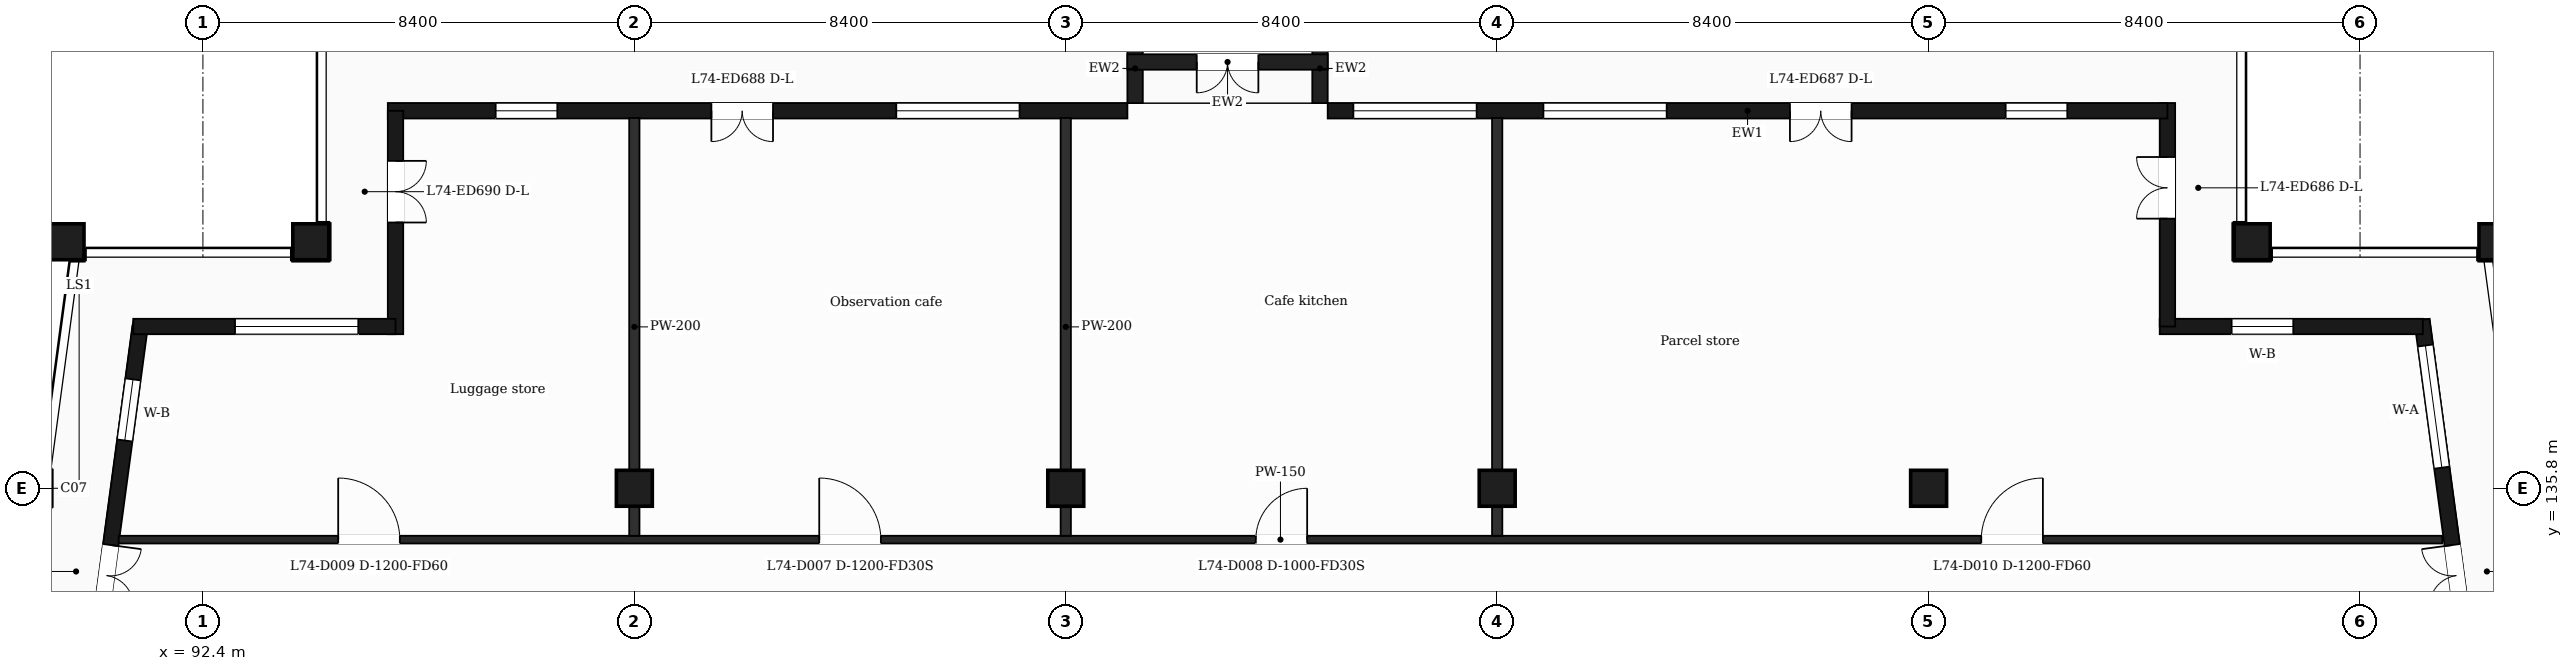
"""IFC4 building model, lengths in metres.
Left out: names, types, materials, properties, quantities, classifications, styles, units other than length and angle.
Written with IfcOpenShell. Run it as: python <this file> out.ifc"""

import sys

from ifc_helpers import new_model, si_unit, direction, frame, frame_2d, origin, origin_2d, place, context, subcontext, project, spatial, rectangle, extrude, element, fill, save


model = new_model("IFC4")
c1 = context("Model", 3, precision=1e-05, world=origin(), true_north=direction((0.0, 1.0)))
c2 = subcontext(c1, "Body", "Model", "MODEL_VIEW")
j1 = project(units=[si_unit("LENGTHUNIT", "METRE"), si_unit("PLANEANGLEUNIT", "RADIAN")], contexts=[c1])
p1 = place(None, origin())
s1 = spatial("IfcSite", under=j1, at=p1, CompositionType="ELEMENT")
p2 = place(p1, origin())
s2 = spatial("IfcBuilding", under=s1, at=p2, CompositionType="ELEMENT")
p3 = place(p2, frame((0.0, 0.0, 303.4)))
s3 = spatial("IfcBuildingStorey", under=s2, at=p3, CompositionType="ELEMENT", Elevation=303.4)
for number, where, z_axis, x_axis in (
    (1, (94.5, 140.6, 0.0), (0.0, 0.0, 1.0), (1.0, 0.0, 0.0)),
    (2, (132.3, 140.6, 0.0), (0.0, 0.0, 1.0), (1.0, 0.0, 0.0)),
    (3, (89.735, 140.6, 0.0), (0.0, 0.0, 1.0), (1.0, 0.0, 0.0)),
    (4, (137.065, 140.6, 0.0), (0.0, 0.0, 1.0), (1.0, 0.0, 0.0)),
    (5, (100.8, 135.8, 0.0), (0.0, 0.0, 1.0), (1.0, 0.0, 0.0)),
    (6, (109.2, 135.8, 0.0), (0.0, 0.0, 1.0), (1.0, 0.0, 0.0)),
    (7, (117.6, 135.8, 0.0), (0.0, 0.0, 1.0), (1.0, 0.0, 0.0)),
    (8, (126.0, 135.8, 0.0), (0.0, 0.0, 1.0), (1.0, 0.0, 0.0)),
):
    element("IfcColumn", number, at=place(p3, frame(where, z_axis=z_axis, x_axis=x_axis)), inside=s3, PredefinedType="COLUMN", context=c2, shape_type="SweptSolid", body=[
        extrude(rectangle(XDim=0.7, YDim=0.7, at=origin_2d()), origin(), (0.0, 0.0, 1.0), 4.5),
    ])
p4 = place(p3, frame((91.177, 138.95, 0.0), z_axis=(0.0, 0.0, 1.0), x_axis=(-0.133426664613, -0.991058689065, 0.0)))
e9 = element("IfcWall", 9, at=p4, inside=s3, PredefinedType="SOLIDWALL", context=c2, shape_type="SweptSolid", body=[
    extrude(rectangle(XDim=6.609, YDim=0.3, at=frame_2d((3.305, 0.0))), origin(), (0.0, 0.0, 1.0), 4.05),
])
p5 = place(p4, frame((1.039, 0.0, 0.9)))
e10 = element("IfcOpeningElement", 10, at=p5, cuts=e9, PredefinedType="OPENING", context=c2, shape_type="SweptSolid", body=[
    extrude(rectangle(XDim=1.2, YDim=2.1, at=frame_2d((0.6, 1.05))), frame((0.0, 0.16, 0.0), z_axis=(0.0, -1.0, 0.0), x_axis=(1.0, 0.0, 0.0)), (0.0, 0.0, 1.0), 0.32),
])
p6 = place(p4, frame((4.294, 0.0, 0.0)))
e11 = element("IfcOpeningElement", 11, at=p6, cuts=e9, PredefinedType="OPENING", context=c2, shape_type="SweptSolid", body=[
    extrude(rectangle(XDim=1.2, YDim=2.4, at=frame_2d((0.6, 1.2))), frame((0.0, 0.16, 0.0), z_axis=(0.0, -1.0, 0.0), x_axis=(1.0, 0.0, 0.0)), (0.0, 0.0, 1.0), 0.32),
])
p7 = place(p3, frame((136.504, 132.4, 0.0), z_axis=(0.0, 0.0, 1.0), x_axis=(-0.133399697462, 0.99106231929, 0.0)))
e12 = element("IfcWall", 12, at=p7, inside=s3, PredefinedType="SOLIDWALL", context=c2, shape_type="SweptSolid", body=[
    extrude(rectangle(XDim=6.74, YDim=0.3, at=frame_2d((3.37, 0.0))), origin(), (0.0, 0.0, 1.0), 4.05),
])
p8 = place(p7, frame((1.115, 0.0, 0.0)))
e13 = element("IfcOpeningElement", 13, at=p8, cuts=e12, PredefinedType="OPENING", context=c2, shape_type="SweptSolid", body=[
    extrude(rectangle(XDim=1.2, YDim=2.4, at=frame_2d((0.6, 1.2))), frame((0.0, 0.16, 0.0), z_axis=(0.0, -1.0, 0.0), x_axis=(1.0, 0.0, 0.0)), (0.0, 0.0, 1.0), 0.32),
])
p9 = place(p7, frame((3.835, 0.0, 0.9)))
e14 = element("IfcOpeningElement", 14, at=p9, cuts=e12, PredefinedType="OPENING", context=c2, shape_type="SweptSolid", body=[
    extrude(rectangle(XDim=2.4, YDim=2.1, at=frame_2d((1.2, 1.05))), frame((0.0, 0.16, 0.0), z_axis=(0.0, -1.0, 0.0), x_axis=(1.0, 0.0, 0.0)), (0.0, 0.0, 1.0), 0.32),
])
p10 = place(p3, frame((135.623, 138.95, 0.0), z_axis=(0.0, 0.0, 1.0), x_axis=(-1.0, 0.0, 0.0)))
e15 = element("IfcWall", 15, at=p10, inside=s3, PredefinedType="SOLIDWALL", context=c2, shape_type="SweptSolid", body=[
    extrude(rectangle(XDim=5.123, YDim=0.3, at=frame_2d((2.561, 0.0))), origin(), (0.0, 0.0, 1.0), 4.05),
])
p11 = place(p10, frame((2.523, 0.0, 0.9)))
e16 = element("IfcOpeningElement", 16, at=p11, cuts=e15, PredefinedType="OPENING", context=c2, shape_type="SweptSolid", body=[
    extrude(rectangle(XDim=1.2, YDim=2.1, at=frame_2d((0.6, 1.05))), frame((0.0, 0.16, 0.0), z_axis=(0.0, -1.0, 0.0), x_axis=(1.0, 0.0, 0.0)), (0.0, 0.0, 1.0), 0.32),
])
p12 = place(p3, frame((130.65, 138.95, 0.0), z_axis=(0.0, 0.0, 1.0), x_axis=(0.0, 1.0, 0.0)))
e17 = element("IfcWall", 17, at=p12, inside=s3, PredefinedType="SOLIDWALL", context=c2, shape_type="SweptSolid", body=[
    extrude(rectangle(XDim=4.35, YDim=0.3, at=frame_2d((2.175, 0.0))), origin(), (0.0, 0.0, 1.0), 4.05),
])
p13 = place(p12, frame((2.1, 0.0, 0.0)))
e18 = element("IfcOpeningElement", 18, at=p13, cuts=e17, PredefinedType="OPENING", context=c2, shape_type="SweptSolid", body=[
    extrude(rectangle(XDim=1.2, YDim=2.4, at=frame_2d((0.6, 1.2))), frame((0.0, 0.16, 0.0), z_axis=(0.0, -1.0, 0.0), x_axis=(1.0, 0.0, 0.0)), (0.0, 0.0, 1.0), 0.32),
])
p14 = place(p3, frame((130.65, 143.15, 0.0), z_axis=(0.0, 0.0, 1.0), x_axis=(-1.0, 0.0, 0.0)))
e19 = element("IfcWall", 19, at=p14, inside=s3, PredefinedType="SOLIDWALL", context=c2, shape_type="SweptSolid", body=[
    extrude(rectangle(XDim=16.35, YDim=0.3, at=frame_2d((8.175, 0.0))), origin(), (0.0, 0.0, 1.0), 4.05),
])
p15 = place(p14, frame((1.95, 0.0, 0.9)))
e20 = element("IfcOpeningElement", 20, at=p15, cuts=e19, PredefinedType="OPENING", context=c2, shape_type="SweptSolid", body=[
    extrude(rectangle(XDim=1.2, YDim=2.1, at=frame_2d((0.6, 1.05))), frame((0.0, 0.16, 0.0), z_axis=(0.0, -1.0, 0.0), x_axis=(1.0, 0.0, 0.0)), (0.0, 0.0, 1.0), 0.32),
])
p16 = place(p14, frame((6.15, 0.0, 0.0)))
e21 = element("IfcOpeningElement", 21, at=p16, cuts=e19, PredefinedType="OPENING", context=c2, shape_type="SweptSolid", body=[
    extrude(rectangle(XDim=1.2, YDim=2.4, at=frame_2d((0.6, 1.2))), frame((0.0, 0.16, 0.0), z_axis=(0.0, -1.0, 0.0), x_axis=(1.0, 0.0, 0.0)), (0.0, 0.0, 1.0), 0.32),
])
p17 = place(p14, frame((9.75, 0.0, 0.9)))
e22 = element("IfcOpeningElement", 22, at=p17, cuts=e19, PredefinedType="OPENING", context=c2, shape_type="SweptSolid", body=[
    extrude(rectangle(XDim=2.4, YDim=2.1, at=frame_2d((1.2, 1.05))), frame((0.0, 0.16, 0.0), z_axis=(0.0, -1.0, 0.0), x_axis=(1.0, 0.0, 0.0)), (0.0, 0.0, 1.0), 0.32),
])
p18 = place(p14, frame((13.45, 0.0, 0.9)))
e23 = element("IfcOpeningElement", 23, at=p18, cuts=e19, PredefinedType="OPENING", context=c2, shape_type="SweptSolid", body=[
    extrude(rectangle(XDim=2.4, YDim=2.1, at=frame_2d((1.2, 1.05))), frame((0.0, 0.16, 0.0), z_axis=(0.0, -1.0, 0.0), x_axis=(1.0, 0.0, 0.0)), (0.0, 0.0, 1.0), 0.32),
])
p19 = place(p3, frame((110.4, 143.15, 0.0), z_axis=(0.0, 0.0, 1.0), x_axis=(-1.0, 0.0, 0.0)))
e24 = element("IfcWall", 24, at=p19, inside=s3, PredefinedType="SOLIDWALL", context=c2, shape_type="SweptSolid", body=[
    extrude(rectangle(XDim=14.4, YDim=0.3, at=frame_2d((7.2, 0.0))), origin(), (0.0, 0.0, 1.0), 4.05),
])
p20 = place(p19, frame((2.1, 0.0, 0.9)))
e25 = element("IfcOpeningElement", 25, at=p20, cuts=e24, PredefinedType="OPENING", context=c2, shape_type="SweptSolid", body=[
    extrude(rectangle(XDim=2.4, YDim=2.1, at=frame_2d((1.2, 1.05))), frame((0.0, 0.16, 0.0), z_axis=(0.0, -1.0, 0.0), x_axis=(1.0, 0.0, 0.0)), (0.0, 0.0, 1.0), 0.32),
])
p21 = place(p19, frame((6.9, 0.0, 0.0)))
e26 = element("IfcOpeningElement", 26, at=p21, cuts=e24, PredefinedType="OPENING", context=c2, shape_type="SweptSolid", body=[
    extrude(rectangle(XDim=1.2, YDim=2.4, at=frame_2d((0.6, 1.2))), frame((0.0, 0.16, 0.0), z_axis=(0.0, -1.0, 0.0), x_axis=(1.0, 0.0, 0.0)), (0.0, 0.0, 1.0), 0.32),
])
p22 = place(p19, frame((11.1, 0.0, 0.9)))
e27 = element("IfcOpeningElement", 27, at=p22, cuts=e24, PredefinedType="OPENING", context=c2, shape_type="SweptSolid", body=[
    extrude(rectangle(XDim=1.2, YDim=2.1, at=frame_2d((0.6, 1.05))), frame((0.0, 0.16, 0.0), z_axis=(0.0, -1.0, 0.0), x_axis=(1.0, 0.0, 0.0)), (0.0, 0.0, 1.0), 0.32),
])
for number, where, z_axis, x_axis in (
    (28, (114.15, 143.3, 0.0), (0.0, 0.0, 1.0), (0.0, 1.0, 0.0)),
    (29, (110.55, 143.3, 0.0), (0.0, 0.0, 1.0), (0.0, 1.0, 0.0)),
):
    element("IfcWall", number, at=place(p3, frame(where, z_axis=z_axis, x_axis=x_axis)), inside=s3, PredefinedType="SOLIDWALL", context=c2, shape_type="SweptSolid", body=[
        extrude(rectangle(XDim=1.35, YDim=0.3, at=frame_2d((0.675, 0.0))), origin(), (0.0, 0.0, 1.0), 4.05),
    ])
p23 = place(p3, frame((114.3, 144.1, 0.0), z_axis=(0.0, 0.0, 1.0), x_axis=(-1.0, 0.0, 0.0)))
e30 = element("IfcWall", 30, at=p23, inside=s3, PredefinedType="SOLIDWALL", context=c2, shape_type="SweptSolid", body=[
    extrude(rectangle(XDim=3.9, YDim=0.3, at=frame_2d((1.95, 0.0))), origin(), (0.0, 0.0, 1.0), 4.05),
])
p24 = place(p23, frame((1.35, 0.0, 0.0)))
e31 = element("IfcOpeningElement", 31, at=p24, cuts=e30, PredefinedType="OPENING", context=c2, shape_type="SweptSolid", body=[
    extrude(rectangle(XDim=1.2, YDim=2.4, at=frame_2d((0.6, 1.2))), frame((0.0, 0.16, 0.0), z_axis=(0.0, -1.0, 0.0), x_axis=(1.0, 0.0, 0.0)), (0.0, 0.0, 1.0), 0.32),
])
p25 = place(p3, frame((96.15, 143.15, 0.0), z_axis=(0.0, 0.0, 1.0), x_axis=(0.0, -1.0, 0.0)))
e32 = element("IfcWall", 32, at=p25, inside=s3, PredefinedType="SOLIDWALL", context=c2, shape_type="SweptSolid", body=[
    extrude(rectangle(XDim=4.35, YDim=0.3, at=frame_2d((2.175, 0.0))), origin(), (0.0, 0.0, 1.0), 4.05),
])
p26 = place(p25, frame((0.975, 0.0, 0.0)))
e33 = element("IfcOpeningElement", 33, at=p26, cuts=e32, PredefinedType="OPENING", context=c2, shape_type="SweptSolid", body=[
    extrude(rectangle(XDim=1.2, YDim=2.4, at=frame_2d((0.6, 1.2))), frame((0.0, 0.16, 0.0), z_axis=(0.0, -1.0, 0.0), x_axis=(1.0, 0.0, 0.0)), (0.0, 0.0, 1.0), 0.32),
])
p27 = place(p3, frame((96.15, 138.95, 0.0), z_axis=(0.0, 0.0, 1.0), x_axis=(-1.0, 0.0, 0.0)))
e34 = element("IfcWall", 34, at=p27, inside=s3, PredefinedType="SOLIDWALL", context=c2, shape_type="SweptSolid", body=[
    extrude(rectangle(XDim=5.104, YDim=0.3, at=frame_2d((2.552, 0.0))), origin(), (0.0, 0.0, 1.0), 4.05),
])
p28 = place(p27, frame((0.725, 0.0, 0.9)))
e35 = element("IfcOpeningElement", 35, at=p28, cuts=e34, PredefinedType="OPENING", context=c2, shape_type="SweptSolid", body=[
    extrude(rectangle(XDim=2.4, YDim=2.1, at=frame_2d((1.2, 1.05))), frame((0.0, 0.16, 0.0), z_axis=(0.0, -1.0, 0.0), x_axis=(1.0, 0.0, 0.0)), (0.0, 0.0, 1.0), 0.32),
])
p29 = place(p3, frame((90.76, 134.8, 0.0), z_axis=(0.0, 0.0, 1.0), x_axis=(1.0, 0.0, 0.0)))
e36 = element("IfcWall", 36, at=p29, inside=s3, PredefinedType="PARTITIONING", context=c2, shape_type="SweptSolid", body=[
    extrude(rectangle(XDim=45.24, YDim=0.15, at=frame_2d((22.62, 0.0))), origin(), (0.0, 0.0, 1.0), 4.05),
])
p30 = place(p29, frame((13.64, 0.0, 0.0)))
e37 = element("IfcOpeningElement", 37, at=p30, cuts=e36, PredefinedType="OPENING", context=c2, shape_type="SweptSolid", body=[
    extrude(rectangle(XDim=1.2, YDim=2.1, at=frame_2d((0.6, 1.05))), frame((0.0, 0.085, 0.0), z_axis=(0.0, -1.0, 0.0), x_axis=(1.0, 0.0, 0.0)), (0.0, 0.0, 1.0), 0.17),
])
p31 = place(p29, frame((22.14, 0.0, 0.0)))
e38 = element("IfcOpeningElement", 38, at=p31, cuts=e36, PredefinedType="OPENING", context=c2, shape_type="SweptSolid", body=[
    extrude(rectangle(XDim=1.0, YDim=2.1, at=frame_2d((0.5, 1.05))), frame((0.0, 0.085, 0.0), z_axis=(0.0, -1.0, 0.0), x_axis=(1.0, 0.0, 0.0)), (0.0, 0.0, 1.0), 0.17),
])
p32 = place(p29, frame((4.274, 0.0, 0.0)))
e39 = element("IfcOpeningElement", 39, at=p32, cuts=e36, PredefinedType="OPENING", context=c2, shape_type="SweptSolid", body=[
    extrude(rectangle(XDim=1.2, YDim=2.1, at=frame_2d((0.6, 1.05))), frame((0.0, 0.085, 0.0), z_axis=(0.0, -1.0, 0.0), x_axis=(1.0, 0.0, 0.0)), (0.0, 0.0, 1.0), 0.17),
])
p33 = place(p29, frame((36.265, 0.0, 0.0)))
e40 = element("IfcOpeningElement", 40, at=p33, cuts=e36, PredefinedType="OPENING", context=c2, shape_type="SweptSolid", body=[
    extrude(rectangle(XDim=1.2, YDim=2.1, at=frame_2d((0.6, 1.05))), frame((0.0, 0.085, 0.0), z_axis=(0.0, -1.0, 0.0), x_axis=(1.0, 0.0, 0.0)), (0.0, 0.0, 1.0), 0.17),
])
for number, where, z_axis, x_axis in (
    (41, (100.8, 134.875, 0.0), (0.0, 0.0, 1.0), (0.0, 1.0, 0.0)),
    (42, (109.2, 134.875, 0.0), (0.0, 0.0, 1.0), (0.0, 1.0, 0.0)),
    (43, (117.6, 134.875, 0.0), (0.0, 0.0, 1.0), (0.0, 1.0, 0.0)),
):
    element("IfcWall", number, at=place(p3, frame(where, z_axis=z_axis, x_axis=x_axis)), inside=s3, PredefinedType="PARTITIONING", context=c2, shape_type="SweptSolid", body=[
        extrude(rectangle(XDim=8.135, YDim=0.2, at=frame_2d((4.067, 0.0))), origin(), (0.0, 0.0, 1.0), 4.05),
    ])
p34 = place(p5, origin())
e44 = element("IfcWindow", 44, at=p34, inside=s3, PartitioningType="SINGLE_PANEL", PredefinedType="WINDOW", context=c2, shape_type="SweptSolid", body=[
    extrude(rectangle(XDim=1.2, YDim=2.1, at=frame_2d((0.6, 1.05))), frame((0.0, 0.03, 0.0), z_axis=(0.0, -1.0, 0.0), x_axis=(1.0, 0.0, 0.0)), (0.0, 0.0, 1.0), 0.06),
])
fill(e10, e44)
p35 = place(p6, origin())
e45 = element("IfcDoor", 45, at=p35, inside=s3, OperationType="DOUBLE_DOOR_SINGLE_SWING", PredefinedType="DOOR", context=c2, shape_type="SweptSolid", body=[
    extrude(rectangle(XDim=1.2, YDim=2.4, at=frame_2d((0.6, 1.2))), frame((0.0, 0.025, 0.0), z_axis=(0.0, -1.0, 0.0), x_axis=(1.0, 0.0, 0.0)), (0.0, 0.0, 1.0), 0.05),
])
fill(e11, e45)
p36 = place(p8, origin())
e46 = element("IfcDoor", 46, at=p36, inside=s3, OperationType="DOUBLE_DOOR_SINGLE_SWING", PredefinedType="DOOR", context=c2, shape_type="SweptSolid", body=[
    extrude(rectangle(XDim=1.2, YDim=2.4, at=frame_2d((0.6, 1.2))), frame((0.0, 0.025, 0.0), z_axis=(0.0, -1.0, 0.0), x_axis=(1.0, 0.0, 0.0)), (0.0, 0.0, 1.0), 0.05),
])
fill(e13, e46)
p37 = place(p9, origin())
e47 = element("IfcWindow", 47, at=p37, inside=s3, PartitioningType="SINGLE_PANEL", PredefinedType="WINDOW", context=c2, shape_type="SweptSolid", body=[
    extrude(rectangle(XDim=2.4, YDim=2.1, at=frame_2d((1.2, 1.05))), frame((0.0, 0.03, 0.0), z_axis=(0.0, -1.0, 0.0), x_axis=(1.0, 0.0, 0.0)), (0.0, 0.0, 1.0), 0.06),
])
fill(e14, e47)
p38 = place(p11, origin())
e48 = element("IfcWindow", 48, at=p38, inside=s3, PartitioningType="SINGLE_PANEL", PredefinedType="WINDOW", context=c2, shape_type="SweptSolid", body=[
    extrude(rectangle(XDim=1.2, YDim=2.1, at=frame_2d((0.6, 1.05))), frame((0.0, 0.03, 0.0), z_axis=(0.0, -1.0, 0.0), x_axis=(1.0, 0.0, 0.0)), (0.0, 0.0, 1.0), 0.06),
])
fill(e16, e48)
p39 = place(p13, origin())
e49 = element("IfcDoor", 49, at=p39, inside=s3, OperationType="DOUBLE_DOOR_SINGLE_SWING", PredefinedType="DOOR", context=c2, shape_type="SweptSolid", body=[
    extrude(rectangle(XDim=1.2, YDim=2.4, at=frame_2d((0.6, 1.2))), frame((0.0, 0.025, 0.0), z_axis=(0.0, -1.0, 0.0), x_axis=(1.0, 0.0, 0.0)), (0.0, 0.0, 1.0), 0.05),
])
fill(e18, e49)
p40 = place(p15, origin())
e50 = element("IfcWindow", 50, at=p40, inside=s3, PartitioningType="SINGLE_PANEL", PredefinedType="WINDOW", context=c2, shape_type="SweptSolid", body=[
    extrude(rectangle(XDim=1.2, YDim=2.1, at=frame_2d((0.6, 1.05))), frame((0.0, 0.03, 0.0), z_axis=(0.0, -1.0, 0.0), x_axis=(1.0, 0.0, 0.0)), (0.0, 0.0, 1.0), 0.06),
])
fill(e20, e50)
p41 = place(p16, origin())
e51 = element("IfcDoor", 51, at=p41, inside=s3, OperationType="DOUBLE_DOOR_SINGLE_SWING", PredefinedType="DOOR", context=c2, shape_type="SweptSolid", body=[
    extrude(rectangle(XDim=1.2, YDim=2.4, at=frame_2d((0.6, 1.2))), frame((0.0, 0.025, 0.0), z_axis=(0.0, -1.0, 0.0), x_axis=(1.0, 0.0, 0.0)), (0.0, 0.0, 1.0), 0.05),
])
fill(e21, e51)
p42 = place(p17, origin())
e52 = element("IfcWindow", 52, at=p42, inside=s3, PartitioningType="SINGLE_PANEL", PredefinedType="WINDOW", context=c2, shape_type="SweptSolid", body=[
    extrude(rectangle(XDim=2.4, YDim=2.1, at=frame_2d((1.2, 1.05))), frame((0.0, 0.03, 0.0), z_axis=(0.0, -1.0, 0.0), x_axis=(1.0, 0.0, 0.0)), (0.0, 0.0, 1.0), 0.06),
])
fill(e22, e52)
p43 = place(p18, origin())
e53 = element("IfcWindow", 53, at=p43, inside=s3, PartitioningType="SINGLE_PANEL", PredefinedType="WINDOW", context=c2, shape_type="SweptSolid", body=[
    extrude(rectangle(XDim=2.4, YDim=2.1, at=frame_2d((1.2, 1.05))), frame((0.0, 0.03, 0.0), z_axis=(0.0, -1.0, 0.0), x_axis=(1.0, 0.0, 0.0)), (0.0, 0.0, 1.0), 0.06),
])
fill(e23, e53)
p44 = place(p20, origin())
e54 = element("IfcWindow", 54, at=p44, inside=s3, PartitioningType="SINGLE_PANEL", PredefinedType="WINDOW", context=c2, shape_type="SweptSolid", body=[
    extrude(rectangle(XDim=2.4, YDim=2.1, at=frame_2d((1.2, 1.05))), frame((0.0, 0.03, 0.0), z_axis=(0.0, -1.0, 0.0), x_axis=(1.0, 0.0, 0.0)), (0.0, 0.0, 1.0), 0.06),
])
fill(e25, e54)
p45 = place(p21, origin())
e55 = element("IfcDoor", 55, at=p45, inside=s3, OperationType="DOUBLE_DOOR_SINGLE_SWING", PredefinedType="DOOR", context=c2, shape_type="SweptSolid", body=[
    extrude(rectangle(XDim=1.2, YDim=2.4, at=frame_2d((0.6, 1.2))), frame((0.0, 0.025, 0.0), z_axis=(0.0, -1.0, 0.0), x_axis=(1.0, 0.0, 0.0)), (0.0, 0.0, 1.0), 0.05),
])
fill(e26, e55)
p46 = place(p22, origin())
e56 = element("IfcWindow", 56, at=p46, inside=s3, PartitioningType="SINGLE_PANEL", PredefinedType="WINDOW", context=c2, shape_type="SweptSolid", body=[
    extrude(rectangle(XDim=1.2, YDim=2.1, at=frame_2d((0.6, 1.05))), frame((0.0, 0.03, 0.0), z_axis=(0.0, -1.0, 0.0), x_axis=(1.0, 0.0, 0.0)), (0.0, 0.0, 1.0), 0.06),
])
fill(e27, e56)
p47 = place(p24, origin())
e57 = element("IfcDoor", 57, at=p47, inside=s3, OperationType="DOUBLE_DOOR_SINGLE_SWING", PredefinedType="DOOR", context=c2, shape_type="SweptSolid", body=[
    extrude(rectangle(XDim=1.2, YDim=2.4, at=frame_2d((0.6, 1.2))), frame((0.0, 0.025, 0.0), z_axis=(0.0, -1.0, 0.0), x_axis=(1.0, 0.0, 0.0)), (0.0, 0.0, 1.0), 0.05),
])
fill(e31, e57)
p48 = place(p26, origin())
e58 = element("IfcDoor", 58, at=p48, inside=s3, OperationType="DOUBLE_DOOR_SINGLE_SWING", PredefinedType="DOOR", context=c2, shape_type="SweptSolid", body=[
    extrude(rectangle(XDim=1.2, YDim=2.4, at=frame_2d((0.6, 1.2))), frame((0.0, 0.025, 0.0), z_axis=(0.0, -1.0, 0.0), x_axis=(1.0, 0.0, 0.0)), (0.0, 0.0, 1.0), 0.05),
])
fill(e33, e58)
p49 = place(p28, origin())
e59 = element("IfcWindow", 59, at=p49, inside=s3, PartitioningType="SINGLE_PANEL", PredefinedType="WINDOW", context=c2, shape_type="SweptSolid", body=[
    extrude(rectangle(XDim=2.4, YDim=2.1, at=frame_2d((1.2, 1.05))), frame((0.0, 0.03, 0.0), z_axis=(0.0, -1.0, 0.0), x_axis=(1.0, 0.0, 0.0)), (0.0, 0.0, 1.0), 0.06),
])
fill(e35, e59)
p50 = place(p30, origin())
e60 = element("IfcDoor", 60, at=p50, inside=s3, OperationType="SINGLE_SWING_LEFT", PredefinedType="DOOR", context=c2, shape_type="SweptSolid", body=[
    extrude(rectangle(XDim=1.2, YDim=2.1, at=frame_2d((0.6, 1.05))), frame((0.0, 0.025, 0.0), z_axis=(0.0, -1.0, 0.0), x_axis=(1.0, 0.0, 0.0)), (0.0, 0.0, 1.0), 0.05),
])
fill(e37, e60)
p51 = place(p31, origin())
e61 = element("IfcDoor", 61, at=p51, inside=s3, OperationType="SINGLE_SWING_RIGHT", PredefinedType="DOOR", context=c2, shape_type="SweptSolid", body=[
    extrude(rectangle(XDim=1.0, YDim=2.1, at=frame_2d((0.5, 1.05))), frame((0.0, 0.025, 0.0), z_axis=(0.0, -1.0, 0.0), x_axis=(1.0, 0.0, 0.0)), (0.0, 0.0, 1.0), 0.05),
])
fill(e38, e61)
p52 = place(p32, origin())
e62 = element("IfcDoor", 62, at=p52, inside=s3, OperationType="SINGLE_SWING_LEFT", PredefinedType="DOOR", context=c2, shape_type="SweptSolid", body=[
    extrude(rectangle(XDim=1.2, YDim=2.1, at=frame_2d((0.6, 1.05))), frame((0.0, 0.025, 0.0), z_axis=(0.0, -1.0, 0.0), x_axis=(1.0, 0.0, 0.0)), (0.0, 0.0, 1.0), 0.05),
])
fill(e39, e62)
p53 = place(p33, origin())
e63 = element("IfcDoor", 63, at=p53, inside=s3, OperationType="SINGLE_SWING_RIGHT", PredefinedType="DOOR", context=c2, shape_type="SweptSolid", body=[
    extrude(rectangle(XDim=1.2, YDim=2.1, at=frame_2d((0.6, 1.05))), frame((0.0, 0.025, 0.0), z_axis=(0.0, -1.0, 0.0), x_axis=(1.0, 0.0, 0.0)), (0.0, 0.0, 1.0), 0.05),
])
fill(e40, e63)
save(model, sys.argv[1])
